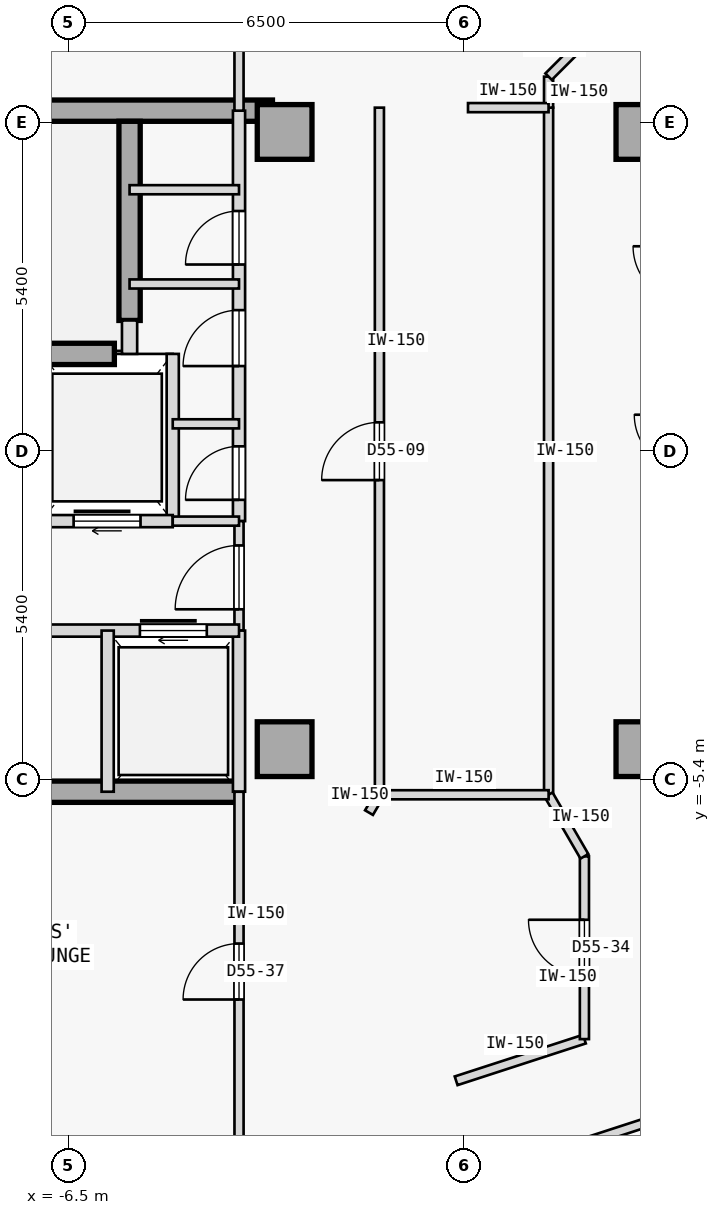
"""IFC4 building model, lengths in metres.
Left out: names, types, materials, properties, quantities, classifications, styles, units other than length and angle.
Written with IfcOpenShell. Run it as: python <this file> out.ifc"""

import sys

from ifc_helpers import new_model, si_unit, direction, frame, frame_2d, origin, origin_2d, place, context, subcontext, project, spatial, rectangle, extrude, element, fill, save


model = new_model("IFC4")
c1 = context("Model", 3, precision=1e-05, world=origin(), true_north=direction((0.0, 1.0)))
c2 = subcontext(c1, "Body", "Model", "MODEL_VIEW")
j1 = project(units=[si_unit("LENGTHUNIT", "METRE"), si_unit("PLANEANGLEUNIT", "RADIAN")], contexts=[c1])
p1 = place(None, origin())
s1 = spatial("IfcSite", under=j1, at=p1, CompositionType="ELEMENT")
p2 = place(p1, origin())
s2 = spatial("IfcBuilding", under=s1, at=p2, CompositionType="ELEMENT")
p3 = place(p2, frame((0.0, 0.0, 210.9)))
s3 = spatial("IfcBuildingStorey", under=s2, at=p3, CompositionType="ELEMENT", Elevation=210.9)
for number, where, z_axis, x_axis in (
    (1, (-2.95, -4.9, 0.0), (0.0, 0.0, 1.0), (1.0, 0.0, 0.0)),
    (2, (-2.95, 5.25, 0.0), (0.0, 0.0, 1.0), (1.0, 0.0, 0.0)),
    (3, (2.95, -4.9, 0.0), (0.0, 0.0, 1.0), (1.0, 0.0, 0.0)),
    (4, (2.95, 5.25, 0.0), (0.0, 0.0, 1.0), (1.0, 0.0, 0.0)),
):
    element("IfcColumn", number, at=place(p3, frame(where, z_axis=z_axis, x_axis=x_axis)), inside=s3, PredefinedType="COLUMN", context=c2, shape_type="SweptSolid", body=[
        extrude(rectangle(XDim=0.9, YDim=0.9, at=origin_2d()), origin(), (0.0, 0.0, 1.0), 3.35),
    ])
p4 = place(p3, frame((-14.56, 5.6, 0.0), z_axis=(0.0, 0.0, 1.0), x_axis=(1.0, 0.0, 0.0)))
e5 = element("IfcWall", 5, at=p4, inside=s3, PredefinedType="SHEAR", context=c2, shape_type="SweptSolid", body=[
    extrude(rectangle(XDim=11.41, YDim=0.35, at=frame_2d((5.705, 0.0))), origin(), (0.0, 0.0, 1.0), 3.125),
])
p5 = place(p3, frame((-14.56, -5.6, 0.0), z_axis=(0.0, 0.0, 1.0), x_axis=(1.0, 0.0, 0.0)))
e6 = element("IfcWall", 6, at=p5, inside=s3, PredefinedType="SHEAR", context=c2, shape_type="SweptSolid", body=[
    extrude(rectangle(XDim=10.86, YDim=0.35, at=frame_2d((5.43, 0.0))), origin(), (0.0, 0.0, 1.0), 3.125),
])
p6 = place(p3, frame((-5.5, 2.15, 0.0), z_axis=(0.0, 0.0, 1.0), x_axis=(0.0, 1.0, 0.0)))
e7 = element("IfcWall", 7, at=p6, inside=s3, PredefinedType="SHEAR", context=c2, shape_type="SweptSolid", body=[
    extrude(rectangle(XDim=3.275, YDim=0.35, at=frame_2d((1.638, 0.0))), origin(), (0.0, 0.0, 1.0), 3.125),
])
p7 = place(p3, frame((-10.9, 1.6, 0.0), z_axis=(0.0, 0.0, 1.0), x_axis=(1.0, 0.0, 0.0)))
e8 = element("IfcWall", 8, at=p7, inside=s3, PredefinedType="SHEAR", context=c2, shape_type="SweptSolid", body=[
    extrude(rectangle(XDim=5.15, YDim=0.35, at=frame_2d((2.575, 0.0))), origin(), (0.0, 0.0, 1.0), 3.125),
])
p8 = place(p3, frame((-5.5, 1.6, 0.0), z_axis=(0.0, 0.0, 1.0), x_axis=(0.0, 1.0, 0.0)))
e9 = element("IfcWall", 9, at=p8, inside=s3, PredefinedType="STANDARD", context=c2, shape_type="SweptSolid", body=[
    extrude(rectangle(XDim=0.55, YDim=0.25, at=frame_2d((0.275, 0.0))), origin(), (0.0, 0.0, 1.0), 3.125),
])
p9 = place(p3, frame((-3.7, -1.15, 0.0), z_axis=(0.0, 0.0, 1.0), x_axis=(0.0, 1.0, 0.0)))
e10 = element("IfcWall", 10, at=p9, inside=s3, PredefinedType="STANDARD", context=c2, shape_type="SweptSolid", body=[
    extrude(rectangle(XDim=6.75, YDim=0.2, at=frame_2d((3.375, 0.0))), origin(), (0.0, 0.0, 1.0), 3.125),
])
p10 = place(p9, frame((0.35, 0.0, 0.0)))
e11 = element("IfcOpeningElement", 11, at=p10, cuts=e10, PredefinedType="OPENING", context=c2, shape_type="SweptSolid", body=[
    extrude(rectangle(XDim=0.88, YDim=2.15, at=frame_2d((0.44, 1.075))), frame((0.0, 0.11, 0.0), z_axis=(0.0, -1.0, 0.0), x_axis=(1.0, 0.0, 0.0)), (0.0, 0.0, 1.0), 0.22),
])
p11 = place(p9, frame((2.55, 0.0, 0.0)))
e12 = element("IfcOpeningElement", 12, at=p11, cuts=e10, PredefinedType="OPENING", context=c2, shape_type="SweptSolid", body=[
    extrude(rectangle(XDim=0.92, YDim=2.15, at=frame_2d((0.46, 1.075))), frame((0.0, 0.11, 0.0), z_axis=(0.0, -1.0, 0.0), x_axis=(1.0, 0.0, 0.0)), (0.0, 0.0, 1.0), 0.22),
])
p12 = place(p9, frame((4.22, 0.0, 0.0)))
e13 = element("IfcOpeningElement", 13, at=p12, cuts=e10, PredefinedType="OPENING", context=c2, shape_type="SweptSolid", body=[
    extrude(rectangle(XDim=0.88, YDim=2.15, at=frame_2d((0.44, 1.075))), frame((0.0, 0.11, 0.0), z_axis=(0.0, -1.0, 0.0), x_axis=(1.0, 0.0, 0.0)), (0.0, 0.0, 1.0), 0.22),
])
p13 = place(p3, frame((-3.7, -2.95, 0.0), z_axis=(0.0, 0.0, 1.0), x_axis=(0.0, 1.0, 0.0)))
e14 = element("IfcWall", 14, at=p13, inside=s3, PredefinedType="PARTITIONING", context=c2, shape_type="SweptSolid", body=[
    extrude(rectangle(XDim=1.8, YDim=0.15, at=frame_2d((0.9, 0.0))), origin(), (0.0, 0.0, 1.0), 3.125),
])
p14 = place(p13, frame((0.35, 0.0, 0.0)))
e15 = element("IfcOpeningElement", 15, at=p14, cuts=e14, PredefinedType="OPENING", context=c2, shape_type="SweptSolid", body=[
    extrude(rectangle(XDim=1.05, YDim=2.18, at=frame_2d((0.525, 1.09))), frame((0.0, 0.085, 0.0), z_axis=(0.0, -1.0, 0.0), x_axis=(1.0, 0.0, 0.0)), (0.0, 0.0, 1.0), 0.17),
])
p15 = place(p3, frame((-3.7, -5.6, 0.0), z_axis=(0.0, 0.0, 1.0), x_axis=(0.0, 1.0, 0.0)))
e16 = element("IfcWall", 16, at=p15, inside=s3, PredefinedType="STANDARD", context=c2, shape_type="SweptSolid", body=[
    extrude(rectangle(XDim=2.65, YDim=0.2, at=frame_2d((1.325, 0.0))), origin(), (0.0, 0.0, 1.0), 3.125),
])
p16 = place(p3, frame((-4.79, -1.15, 0.0), z_axis=(0.0, 0.0, 1.0), x_axis=(0.0, 1.0, 0.0)))
e17 = element("IfcWall", 17, at=p16, inside=s3, PredefinedType="STANDARD", context=c2, shape_type="SweptSolid", body=[
    extrude(rectangle(XDim=2.75, YDim=0.2, at=frame_2d((1.375, 0.0))), origin(), (0.0, 0.0, 1.0), 3.125),
])
p17 = place(p3, frame((-6.95, -1.15, 0.0), z_axis=(0.0, 0.0, 1.0), x_axis=(1.0, 0.0, 0.0)))
e18 = element("IfcWall", 18, at=p17, inside=s3, PredefinedType="STANDARD", context=c2, shape_type="SweptSolid", body=[
    extrude(rectangle(XDim=2.16, YDim=0.2, at=frame_2d((1.08, 0.0))), origin(), (0.0, 0.0, 1.0), 3.125),
])
p18 = place(p17, frame((0.53, 0.0, 0.0)))
e19 = element("IfcOpeningElement", 19, at=p18, cuts=e18, PredefinedType="OPENING", context=c2, shape_type="SweptSolid", body=[
    extrude(rectangle(XDim=1.1, YDim=2.15, at=frame_2d((0.55, 1.075))), frame((0.0, 0.11, 0.0), z_axis=(0.0, -1.0, 0.0), x_axis=(1.0, 0.0, 0.0)), (0.0, 0.0, 1.0), 0.22),
])
p19 = place(p3, frame((-4.79, -1.15, 0.0), z_axis=(0.0, 0.0, 1.0), x_axis=(1.0, 0.0, 0.0)))
e20 = element("IfcWall", 20, at=p19, inside=s3, PredefinedType="PARTITIONING", context=c2, shape_type="SweptSolid", body=[
    extrude(rectangle(XDim=1.09, YDim=0.15, at=frame_2d((0.545, 0.0))), origin(), (0.0, 0.0, 1.0), 3.125),
])
p20 = place(p3, frame((-14.5, -2.95, 0.0), z_axis=(0.0, 0.0, 1.0), x_axis=(1.0, 0.0, 0.0)))
e21 = element("IfcWall", 21, at=p20, inside=s3, PredefinedType="STANDARD", context=c2, shape_type="SweptSolid", body=[
    extrude(rectangle(XDim=10.8, YDim=0.2, at=frame_2d((5.4, 0.0))), origin(), (0.0, 0.0, 1.0), 3.125),
])
p21 = place(p20, frame((9.17, 0.0, 0.0)))
e22 = element("IfcOpeningElement", 22, at=p21, cuts=e21, PredefinedType="OPENING", context=c2, shape_type="SweptSolid", body=[
    extrude(rectangle(XDim=1.1, YDim=2.15, at=frame_2d((0.55, 1.075))), frame((0.0, 0.11, 0.0), z_axis=(0.0, -1.0, 0.0), x_axis=(1.0, 0.0, 0.0)), (0.0, 0.0, 1.0), 0.22),
])
p22 = place(p20, frame((3.86, 0.0, 0.0)))
e23 = element("IfcOpeningElement", 23, at=p22, cuts=e21, PredefinedType="OPENING", context=c2, shape_type="SweptSolid", body=[
    extrude(rectangle(XDim=0.92, YDim=2.15, at=frame_2d((0.46, 1.075))), frame((0.0, 0.11, 0.0), z_axis=(0.0, -1.0, 0.0), x_axis=(1.0, 0.0, 0.0)), (0.0, 0.0, 1.0), 0.22),
])
p23 = place(p3, frame((-5.86, -5.6, 0.0), z_axis=(0.0, 0.0, 1.0), x_axis=(0.0, 1.0, 0.0)))
e24 = element("IfcWall", 24, at=p23, inside=s3, PredefinedType="STANDARD", context=c2, shape_type="SweptSolid", body=[
    extrude(rectangle(XDim=2.65, YDim=0.2, at=frame_2d((1.325, 0.0))), origin(), (0.0, 0.0, 1.0), 3.125),
])
p24 = place(p3, frame((-5.5, 4.3, 0.0), z_axis=(0.0, 0.0, 1.0), x_axis=(1.0, 0.0, 0.0)))
e25 = element("IfcWall", 25, at=p24, inside=s3, PredefinedType="PARTITIONING", context=c2, shape_type="SweptSolid", body=[
    extrude(rectangle(XDim=1.8, YDim=0.15, at=frame_2d((0.9, 0.0))), origin(), (0.0, 0.0, 1.0), 3.125),
])
p25 = place(p3, frame((-4.79, 0.45, 0.0), z_axis=(0.0, 0.0, 1.0), x_axis=(1.0, 0.0, 0.0)))
e26 = element("IfcWall", 26, at=p25, inside=s3, PredefinedType="PARTITIONING", context=c2, shape_type="SweptSolid", body=[
    extrude(rectangle(XDim=1.09, YDim=0.15, at=frame_2d((0.545, 0.0))), origin(), (0.0, 0.0, 1.0), 3.125),
])
p26 = place(p3, frame((-5.5, 2.75, 0.0), z_axis=(0.0, 0.0, 1.0), x_axis=(1.0, 0.0, 0.0)))
e27 = element("IfcWall", 27, at=p26, inside=s3, PredefinedType="PARTITIONING", context=c2, shape_type="SweptSolid", body=[
    extrude(rectangle(XDim=1.8, YDim=0.15, at=frame_2d((0.9, 0.0))), origin(), (0.0, 0.0, 1.0), 3.125),
])
p27 = place(p3, frame((-1.391, -5.65, 0.0), z_axis=(0.0, 0.0, 1.0), x_axis=(-8.6422954e-05, 0.999999996266, 0.0)))
e28 = element("IfcWall", 28, at=p27, inside=s3, PredefinedType="PARTITIONING", context=c2, shape_type="SweptSolid", body=[
    extrude(rectangle(XDim=11.3, YDim=0.15, at=frame_2d((5.65, 0.0))), origin(), (0.0, 0.0, 1.0), 3.125),
])
p28 = place(p27, frame((5.175, 0.0, 0.0)))
e29 = element("IfcOpeningElement", 29, at=p28, cuts=e28, PredefinedType="OPENING", context=c2, shape_type="SweptSolid", body=[
    extrude(rectangle(XDim=0.95, YDim=2.15, at=frame_2d((0.475, 1.075))), frame((0.0, 0.085, 0.0), z_axis=(0.0, -1.0, 0.0), x_axis=(1.0, 0.0, 0.0)), (0.0, 0.0, 1.0), 0.17),
])
p29 = place(p3, frame((1.391, -5.648, 0.0), z_axis=(0.0, 0.0, 1.0), x_axis=(-4.3218947e-05, 0.999999999066, 0.0)))
e30 = element("IfcWall", 30, at=p29, inside=s3, PredefinedType="PARTITIONING", context=c2, shape_type="SweptSolid", body=[
    extrude(rectangle(XDim=11.298, YDim=0.15, at=frame_2d((5.649, 0.0))), origin(), (0.0, 0.0, 1.0), 3.125),
])
p30 = place(p3, frame((-1.643, -12.549, 0.0), z_axis=(0.0, 0.0, 1.0), x_axis=(0.951058161173, 0.309011931914, 0.0)))
e31 = element("IfcWall", 31, at=p30, inside=s3, PredefinedType="PARTITIONING", context=c2, shape_type="SweptSolid", body=[
    extrude(rectangle(XDim=7.297, YDim=0.15, at=frame_2d((3.648, 0.0))), origin(), (0.0, 0.0, 1.0), 3.125),
])
p31 = place(p3, frame((-0.129, -10.354, 0.0), z_axis=(0.0, 0.0, 1.0), x_axis=(0.951066420845, 0.308986509643, 0.0)))
e32 = element("IfcWall", 32, at=p31, inside=s3, PredefinedType="PARTITIONING", context=c2, shape_type="SweptSolid", body=[
    extrude(rectangle(XDim=2.218, YDim=0.15, at=frame_2d((1.109, 0.0))), origin(), (0.0, 0.0, 1.0), 3.125),
])
p32 = place(p3, frame((-1.562, -5.944, 0.0), z_axis=(0.0, 0.0, 1.0), x_axis=(0.505387839696, 0.862892305845, 0.0)))
e33 = element("IfcWall", 33, at=p32, inside=s3, PredefinedType="PARTITIONING", context=c2, shape_type="SweptSolid", body=[
    extrude(rectangle(XDim=0.34, YDim=0.15, at=frame_2d((0.17, 0.0))), origin(), (0.0, 0.0, 1.0), 3.125),
])
p33 = place(p3, frame((1.98, -9.668, 0.0), z_axis=(0.0, 0.0, 1.0), x_axis=(8.1241368e-05, 0.9999999967, 0.0)))
e34 = element("IfcWall", 34, at=p33, inside=s3, PredefinedType="PARTITIONING", context=c2, shape_type="SweptSolid", body=[
    extrude(rectangle(XDim=3.005, YDim=0.15, at=frame_2d((1.502, 0.0))), origin(), (0.0, 0.0, 1.0), 3.125),
])
p34 = place(p33, frame((1.042, 0.0, 0.0)))
e35 = element("IfcOpeningElement", 35, at=p34, cuts=e34, PredefinedType="OPENING", context=c2, shape_type="SweptSolid", body=[
    extrude(rectangle(XDim=0.92, YDim=2.15, at=frame_2d((0.46, 1.075))), frame((0.0, 0.085, 0.0), z_axis=(0.0, -1.0, 0.0), x_axis=(1.0, 0.0, 0.0)), (0.0, 0.0, 1.0), 0.17),
])
p35 = place(p3, frame((1.391, -5.649, 0.0), z_axis=(0.0, 0.0, 1.0), x_axis=(0.502522642426, -0.864564048437, 0.0)))
e36 = element("IfcWall", 36, at=p35, inside=s3, PredefinedType="PARTITIONING", context=c2, shape_type="SweptSolid", body=[
    extrude(rectangle(XDim=1.171, YDim=0.15, at=frame_2d((0.586, 0.0))), origin(), (0.0, 0.0, 1.0), 3.125),
])
p36 = place(p3, frame((-3.7, -11.514, 0.0), z_axis=(0.0, 0.0, 1.0), x_axis=(-8.2572974e-05, 0.999999996591, 0.0)))
e37 = element("IfcWall", 37, at=p36, inside=s3, PredefinedType="PARTITIONING", context=c2, shape_type="SweptSolid", body=[
    extrude(rectangle(XDim=5.913, YDim=0.15, at=frame_2d((2.957, 0.0))), origin(), (0.0, 0.0, 1.0), 3.125),
])
p37 = place(p36, frame((2.497, 0.0, 0.0)))
e38 = element("IfcOpeningElement", 38, at=p37, cuts=e37, PredefinedType="OPENING", context=c2, shape_type="SweptSolid", body=[
    extrude(rectangle(XDim=0.92, YDim=2.15, at=frame_2d((0.46, 1.075))), frame((0.0, 0.085, 0.0), z_axis=(0.0, -1.0, 0.0), x_axis=(1.0, 0.0, 0.0)), (0.0, 0.0, 1.0), 0.17),
])
p38 = place(p3, frame((1.391, 5.649, 0.0), z_axis=(0.0, 0.0, 1.0), x_axis=(0.000957395444, 0.999999541697, 0.0)))
e39 = element("IfcWall", 39, at=p38, inside=s3, PredefinedType="PARTITIONING", context=c2, shape_type="SweptSolid", body=[
    extrude(rectangle(XDim=0.51, YDim=0.15, at=frame_2d((0.255, 0.0))), origin(), (0.0, 0.0, 1.0), 3.125),
])
p39 = place(p3, frame((1.391, 6.159, 0.0), z_axis=(0.0, 0.0, 1.0), x_axis=(0.707106781187, 0.707106781187, 0.0)))
e40 = element("IfcWall", 40, at=p39, inside=s3, PredefinedType="PARTITIONING", context=c2, shape_type="SweptSolid", body=[
    extrude(rectangle(XDim=0.833, YDim=0.15, at=frame_2d((0.417, 0.0))), origin(), (0.0, 0.0, 1.0), 3.125),
])
p40 = place(p3, frame((-3.7, 5.6, 0.0), z_axis=(0.0, 0.0, 1.0), x_axis=(0.000139120755, 0.999999990323, 0.0)))
e41 = element("IfcWall", 41, at=p40, inside=s3, PredefinedType="PARTITIONING", context=c2, shape_type="SweptSolid", body=[
    extrude(rectangle(XDim=3.51, YDim=0.15, at=frame_2d((1.755, 0.0))), origin(), (0.0, 0.0, 1.0), 3.125),
])
p41 = place(p3, frame((-1.391, -5.65, 0.0), z_axis=(0.0, 0.0, 1.0), x_axis=(0.999999965344, 0.000263273356, 0.0)))
e42 = element("IfcWall", 42, at=p41, inside=s3, PredefinedType="PARTITIONING", context=c2, shape_type="SweptSolid", body=[
    extrude(rectangle(XDim=2.782, YDim=0.15, at=frame_2d((1.391, 0.0))), origin(), (0.0, 0.0, 1.0), 3.125),
])
p42 = place(p3, frame((0.066, 5.65, 0.0), z_axis=(0.0, 0.0, 1.0), x_axis=(0.999999932094, -0.000368527707, 0.0)))
e43 = element("IfcWall", 43, at=p42, inside=s3, PredefinedType="PARTITIONING", context=c2, shape_type="SweptSolid", body=[
    extrude(rectangle(XDim=1.325, YDim=0.15, at=frame_2d((0.663, 0.0))), origin(), (0.0, 0.0, 1.0), 3.125),
])
p43 = place(p14, origin())
e44 = element("IfcDoor", 44, at=p43, inside=s3, OperationType="SINGLE_SWING_LEFT", PredefinedType="DOOR", context=c2, shape_type="SweptSolid", body=[
    extrude(rectangle(XDim=1.05, YDim=2.18, at=frame_2d((0.525, 1.09))), frame((0.0, 0.025, 0.0), z_axis=(0.0, -1.0, 0.0), x_axis=(1.0, 0.0, 0.0)), (0.0, 0.0, 1.0), 0.05),
])
fill(e15, e44)
p44 = place(p18, origin())
e45 = element("IfcDoor", 45, at=p44, inside=s3, OperationType="SLIDING_TO_RIGHT", PredefinedType="DOOR", context=c2, shape_type="SweptSolid", body=[
    extrude(rectangle(XDim=1.1, YDim=2.15, at=frame_2d((0.55, 1.075))), frame((0.0, 0.025, 0.0), z_axis=(0.0, -1.0, 0.0), x_axis=(1.0, 0.0, 0.0)), (0.0, 0.0, 1.0), 0.05),
])
fill(e19, e45)
p45 = place(p21, origin())
e46 = element("IfcDoor", 46, at=p45, inside=s3, OperationType="SLIDING_TO_RIGHT", PredefinedType="DOOR", context=c2, shape_type="SweptSolid", body=[
    extrude(rectangle(XDim=1.1, YDim=2.15, at=frame_2d((0.55, 1.075))), frame((0.0, 0.025, 0.0), z_axis=(0.0, -1.0, 0.0), x_axis=(1.0, 0.0, 0.0)), (0.0, 0.0, 1.0), 0.05),
])
fill(e22, e46)
p46 = place(p10, origin())
e47 = element("IfcDoor", 47, at=p46, inside=s3, OperationType="SINGLE_SWING_LEFT", PredefinedType="DOOR", context=c2, shape_type="SweptSolid", body=[
    extrude(rectangle(XDim=0.88, YDim=2.15, at=frame_2d((0.44, 1.075))), frame((0.0, 0.025, 0.0), z_axis=(0.0, -1.0, 0.0), x_axis=(1.0, 0.0, 0.0)), (0.0, 0.0, 1.0), 0.05),
])
fill(e11, e47)
p47 = place(p11, origin())
e48 = element("IfcDoor", 48, at=p47, inside=s3, OperationType="SINGLE_SWING_LEFT", PredefinedType="DOOR", context=c2, shape_type="SweptSolid", body=[
    extrude(rectangle(XDim=0.92, YDim=2.15, at=frame_2d((0.46, 1.075))), frame((0.0, 0.025, 0.0), z_axis=(0.0, -1.0, 0.0), x_axis=(1.0, 0.0, 0.0)), (0.0, 0.0, 1.0), 0.05),
])
fill(e12, e48)
p48 = place(p12, origin())
e49 = element("IfcDoor", 49, at=p48, inside=s3, OperationType="SINGLE_SWING_LEFT", PredefinedType="DOOR", context=c2, shape_type="SweptSolid", body=[
    extrude(rectangle(XDim=0.88, YDim=2.15, at=frame_2d((0.44, 1.075))), frame((0.0, 0.025, 0.0), z_axis=(0.0, -1.0, 0.0), x_axis=(1.0, 0.0, 0.0)), (0.0, 0.0, 1.0), 0.05),
])
fill(e13, e49)
p49 = place(p28, origin())
e50 = element("IfcDoor", 50, at=p49, inside=s3, OperationType="SINGLE_SWING_LEFT", PredefinedType="DOOR", context=c2, shape_type="SweptSolid", body=[
    extrude(rectangle(XDim=0.95, YDim=2.15, at=frame_2d((0.475, 1.075))), frame((0.0, 0.025, 0.0), z_axis=(0.0, -1.0, 0.0), x_axis=(1.0, 0.0, 0.0)), (0.0, 0.0, 1.0), 0.05),
])
fill(e29, e50)
p50 = place(p34, origin())
e51 = element("IfcDoor", 51, at=p50, inside=s3, OperationType="SINGLE_SWING_RIGHT", PredefinedType="DOOR", context=c2, shape_type="SweptSolid", body=[
    extrude(rectangle(XDim=0.92, YDim=2.15, at=frame_2d((0.46, 1.075))), frame((0.0, 0.025, 0.0), z_axis=(0.0, -1.0, 0.0), x_axis=(1.0, 0.0, 0.0)), (0.0, 0.0, 1.0), 0.05),
])
fill(e35, e51)
p51 = place(p37, origin())
e52 = element("IfcDoor", 52, at=p51, inside=s3, OperationType="SINGLE_SWING_LEFT", PredefinedType="DOOR", context=c2, shape_type="SweptSolid", body=[
    extrude(rectangle(XDim=0.92, YDim=2.15, at=frame_2d((0.46, 1.075))), frame((0.0, 0.025, 0.0), z_axis=(0.0, -1.0, 0.0), x_axis=(1.0, 0.0, 0.0)), (0.0, 0.0, 1.0), 0.05),
])
fill(e38, e52)
save(model, sys.argv[1])
